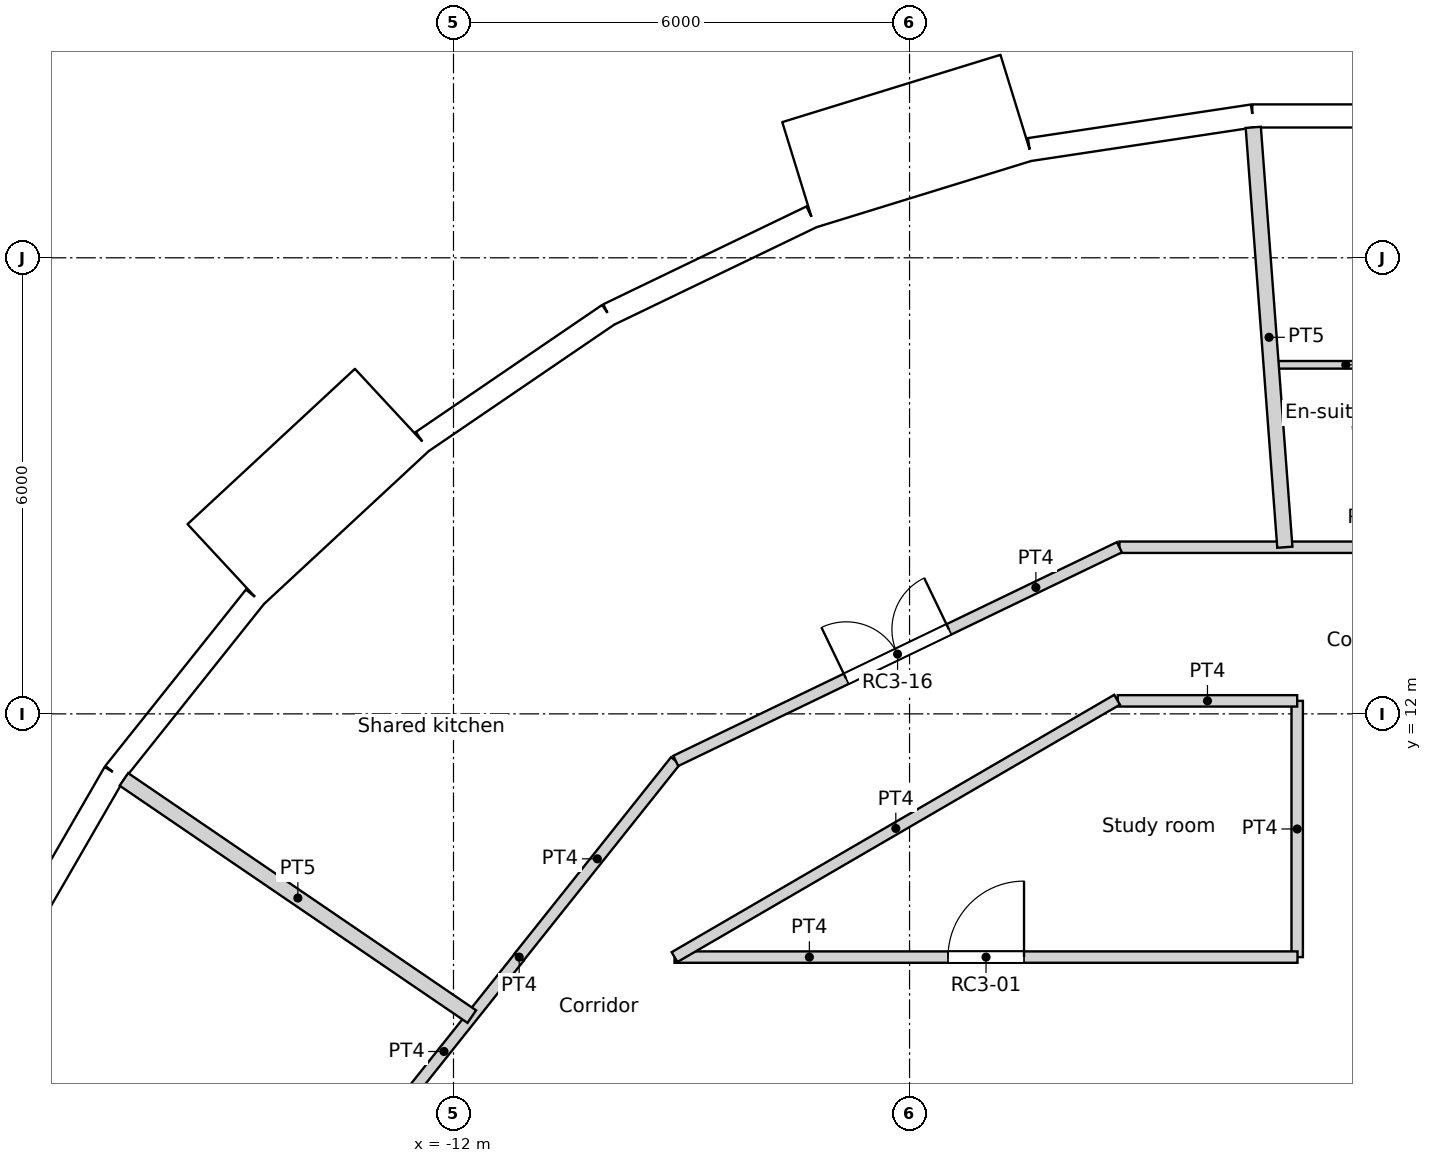
"""IFC4 building model, lengths in metres.
Left out: names, types, materials, properties, quantities, classifications, styles, units other than length and angle.
Written with IfcOpenShell. Run it as: python <this file> out.ifc"""

import sys

from ifc_helpers import new_model, si_unit, direction, frame, frame_2d, origin, origin_2d, place, context, subcontext, project, spatial, rectangle, circle, extrude, element, fill, save


model = new_model("IFC4")
c1 = context("Model", 3, precision=1e-05, world=origin(), true_north=direction((0.0, 1.0)))
c2 = subcontext(c1, "Body", "Model", "MODEL_VIEW")
j1 = project(units=[si_unit("LENGTHUNIT", "METRE"), si_unit("PLANEANGLEUNIT", "RADIAN")], contexts=[c1])
p1 = place(None, origin())
s1 = spatial("IfcSite", under=j1, at=p1, CompositionType="ELEMENT")
p2 = place(p1, origin())
s2 = spatial("IfcBuilding", under=s1, at=p2, CompositionType="ELEMENT")
p3 = place(p2, frame((0.0, 0.0, 252.6)))
s3 = spatial("IfcBuildingStorey", under=s2, at=p3, CompositionType="ELEMENT", Elevation=252.6)
for number, where, z_axis, x_axis in (
    (1, (-4.188, 18.35, 0.0), (0.0, 0.0, 1.0), (1.0, 0.0, 0.0)),
    (2, (-9.411, 16.301, 0.0), (0.0, 0.0, 1.0), (1.0, 0.0, 0.0)),
    (3, (-13.798, 12.802, 0.0), (0.0, 0.0, 1.0), (1.0, 0.0, 0.0)),
    (4, (-16.958, 8.167, 0.0), (0.0, 0.0, 1.0), (1.0, 0.0, 0.0)),
):
    element("IfcColumn", number, at=place(p3, frame(where, z_axis=z_axis, x_axis=x_axis)), inside=s3, PredefinedType="COLUMN", context=c2, shape_type="SweptSolid", body=[
        extrude(circle(Radius=0.55, at=origin_2d()), origin(), (0.0, 0.0, 1.0), 3.6),
    ])
p4 = place(p3, frame((1.473, 19.866, 0.0), z_axis=(0.0, 0.0, 1.0), x_axis=(-1.0, 0.0, 0.0)))
e5 = element("IfcWall", 5, at=p4, inside=s3, PredefinedType="SOLIDWALL", context=c2, shape_type="SweptSolid", body=[
    extrude(rectangle(XDim=2.962, YDim=0.3, at=frame_2d((1.481, 0.0))), origin(), (0.0, 0.0, 1.0), 3.25),
])
p5 = place(p4, frame((1.481, 0.0, 1.55)))
e6 = element("IfcOpeningElement", 6, at=p5, cuts=e5, PredefinedType="OPENING", context=c2, shape_type="SweptSolid", body=[
    extrude(circle(Radius=0.9, at=origin_2d()), frame((0.0, 0.16, 0.0), z_axis=(0.0, -1.0, 0.0), x_axis=(1.0, 0.0, 0.0)), (0.0, 0.0, 1.0), 0.32),
])
p6 = place(p3, frame((-1.489, 19.866, 0.0), z_axis=(0.0, 0.0, 1.0), x_axis=(-0.988835775663, -0.149009425104, 0.0)))
e7 = element("IfcWall", 7, at=p6, inside=s3, PredefinedType="SOLIDWALL", context=c2, shape_type="SweptSolid", body=[
    extrude(rectangle(XDim=2.962, YDim=0.3, at=frame_2d((1.481, 0.0))), origin(), (0.0, 0.0, 1.0), 3.25),
])
p7 = place(p6, frame((1.481, 0.0, 1.55)))
e8 = element("IfcOpeningElement", 8, at=p7, cuts=e7, PredefinedType="OPENING", context=c2, shape_type="SweptSolid", body=[
    extrude(circle(Radius=0.9, at=origin_2d()), frame((0.0, 0.16, 0.0), z_axis=(0.0, -1.0, 0.0), x_axis=(1.0, 0.0, 0.0)), (0.0, 0.0, 1.0), 0.32),
])
p8 = place(p3, frame((-4.592, 19.975, -0.35), z_axis=(0.0, 0.0, 1.0), x_axis=(-0.955571139978, -0.294760574774, 0.0)))
e9 = element("IfcWall", 9, at=p8, inside=s3, PredefinedType="ELEMENTEDWALL", context=c2, shape_type="SweptSolid", body=[
    extrude(rectangle(XDim=3.0, YDim=1.45, at=frame_2d((1.5, 0.0))), origin(), (0.0, 0.0, 1.0), 3.6),
])
p9 = place(p8, frame((1.5, 0.0, 1.9)))
e10 = element("IfcOpeningElement", 10, at=p9, cuts=e9, PredefinedType="OPENING", context=c2, shape_type="SweptSolid", body=[
    extrude(circle(Radius=0.9, at=origin_2d()), frame((0.0, 0.735, 0.0), z_axis=(0.0, -1.0, 0.0), x_axis=(1.0, 0.0, 0.0)), (0.0, 0.0, 1.0), 1.47),
])
p10 = place(p3, frame((-7.292, 18.538, 0.0), z_axis=(0.0, 0.0, 1.0), x_axis=(-0.90095513435, -0.433912255978, 0.0)))
e11 = element("IfcWall", 11, at=p10, inside=s3, PredefinedType="SOLIDWALL", context=c2, shape_type="SweptSolid", body=[
    extrude(rectangle(XDim=2.962, YDim=0.3, at=frame_2d((1.481, 0.0))), origin(), (0.0, 0.0, 1.0), 3.25),
])
p11 = place(p10, frame((1.481, 0.0, 1.55)))
e12 = element("IfcOpeningElement", 12, at=p11, cuts=e11, PredefinedType="OPENING", context=c2, shape_type="SweptSolid", body=[
    extrude(circle(Radius=0.9, at=origin_2d()), frame((0.0, 0.16, 0.0), z_axis=(0.0, -1.0, 0.0), x_axis=(1.0, 0.0, 0.0)), (0.0, 0.0, 1.0), 0.32),
])
p12 = place(p3, frame((-9.961, 17.253, 0.0), z_axis=(0.0, 0.0, 1.0), x_axis=(-0.826236061068, -0.563324037646, 0.0)))
e13 = element("IfcWall", 13, at=p12, inside=s3, PredefinedType="SOLIDWALL", context=c2, shape_type="SweptSolid", body=[
    extrude(rectangle(XDim=2.962, YDim=0.3, at=frame_2d((1.481, 0.0))), origin(), (0.0, 0.0, 1.0), 3.25),
])
p13 = place(p12, frame((1.481, 0.0, 1.55)))
e14 = element("IfcOpeningElement", 14, at=p13, cuts=e13, PredefinedType="OPENING", context=c2, shape_type="SweptSolid", body=[
    extrude(circle(Radius=0.9, at=origin_2d()), frame((0.0, 0.16, 0.0), z_axis=(0.0, -1.0, 0.0), x_axis=(1.0, 0.0, 0.0)), (0.0, 0.0, 1.0), 0.32),
])
p14 = place(p3, frame((-12.804, 16.005, -0.35), z_axis=(0.0, 0.0, 1.0), x_axis=(-0.733022439167, -0.680204457261, 0.0)))
e15 = element("IfcWall", 15, at=p14, inside=s3, PredefinedType="ELEMENTEDWALL", context=c2, shape_type="SweptSolid", body=[
    extrude(rectangle(XDim=3.0, YDim=1.45, at=frame_2d((1.5, 0.0))), origin(), (0.0, 0.0, 1.0), 3.6),
])
p15 = place(p14, frame((1.5, 0.0, 1.9)))
e16 = element("IfcOpeningElement", 16, at=p15, cuts=e15, PredefinedType="OPENING", context=c2, shape_type="SweptSolid", body=[
    extrude(circle(Radius=0.9, at=origin_2d()), frame((0.0, 0.735, 0.0), z_axis=(0.0, -1.0, 0.0), x_axis=(1.0, 0.0, 0.0)), (0.0, 0.0, 1.0), 1.47),
])
p16 = place(p3, frame((-14.613, 13.538, 0.0), z_axis=(0.0, 0.0, 1.0), x_axis=(-0.623498236992, -0.781824755599, 0.0)))
e17 = element("IfcWall", 17, at=p16, inside=s3, PredefinedType="SOLIDWALL", context=c2, shape_type="SweptSolid", body=[
    extrude(rectangle(XDim=2.962, YDim=0.3, at=frame_2d((1.481, 0.0))), origin(), (0.0, 0.0, 1.0), 3.25),
])
p17 = place(p16, frame((1.481, 0.0, 1.55)))
e18 = element("IfcOpeningElement", 18, at=p17, cuts=e17, PredefinedType="OPENING", context=c2, shape_type="SweptSolid", body=[
    extrude(circle(Radius=0.9, at=origin_2d()), frame((0.0, 0.16, 0.0), z_axis=(0.0, -1.0, 0.0), x_axis=(1.0, 0.0, 0.0)), (0.0, 0.0, 1.0), 0.32),
])
p18 = place(p3, frame((-16.46, 11.222, 0.0), z_axis=(0.0, 0.0, 1.0), x_axis=(-0.499950756475, -0.86605383268, 0.0)))
e19 = element("IfcWall", 19, at=p18, inside=s3, PredefinedType="SOLIDWALL", context=c2, shape_type="SweptSolid", body=[
    extrude(rectangle(XDim=2.962, YDim=0.3, at=frame_2d((1.481, 0.0))), origin(), (0.0, 0.0, 1.0), 3.25),
])
p19 = place(p18, frame((1.481, 0.0, 1.55)))
e20 = element("IfcOpeningElement", 20, at=p19, cuts=e19, PredefinedType="OPENING", context=c2, shape_type="SweptSolid", body=[
    extrude(circle(Radius=0.9, at=origin_2d()), frame((0.0, 0.16, 0.0), z_axis=(0.0, -1.0, 0.0), x_axis=(1.0, 0.0, 0.0)), (0.0, 0.0, 1.0), 0.32),
])
p20 = place(p3, frame((-9.092, 8.8, 0.0), z_axis=(0.0, 0.0, 1.0), x_axis=(0.864470922103, 0.502682827277, 0.0)))
e21 = element("IfcWall", 21, at=p20, inside=s3, PredefinedType="PARTITIONING", context=c2, shape_type="SweptSolid", body=[
    extrude(rectangle(XDim=6.735, YDim=0.15, at=frame_2d((3.368, 0.0))), origin(), (0.0, 0.0, 1.0), 3.25),
])
p21 = place(p3, frame((-9.092, 8.8, 0.0), z_axis=(0.0, 0.0, 1.0), x_axis=(1.0, 0.0, 0.0)))
e22 = element("IfcWall", 22, at=p21, inside=s3, PredefinedType="PARTITIONING", context=c2, shape_type="SweptSolid", body=[
    extrude(rectangle(XDim=8.196, YDim=0.15, at=frame_2d((4.098, 0.0))), origin(), (0.0, 0.0, 1.0), 3.25),
])
p22 = place(p21, frame((3.598, 0.0, 0.0)))
e23 = element("IfcOpeningElement", 23, at=p22, cuts=e22, PredefinedType="OPENING", context=c2, shape_type="SweptSolid", body=[
    extrude(rectangle(XDim=1.0, YDim=2.04, at=frame_2d((0.5, 1.02))), frame((0.0, 0.075, 0.0), z_axis=(0.0, -1.0, 0.0), x_axis=(1.0, 0.0, 0.0)), (0.0, 0.0, 1.0), 0.15),
])
p23 = place(p3, frame((-11.134, 8.8, 0.0), z_axis=(0.0, 0.0, 1.0), x_axis=(-1.0, 0.0, 0.0)))
e24 = element("IfcWall", 24, at=p23, inside=s3, PredefinedType="PARTITIONING", context=c2, shape_type="SweptSolid", body=[
    extrude(rectangle(XDim=0.003, YDim=0.15, at=frame_2d((0.001, 0.0))), origin(), (0.0, 0.0, 1.0), 3.25),
])
p24 = place(p3, frame((-11.136, 8.802, 0.0), z_axis=(0.0, 0.0, 1.0), x_axis=(0.623151397235, 0.782101231379, 0.0)))
e25 = element("IfcWall", 25, at=p24, inside=s3, PredefinedType="PARTITIONING", context=c2, shape_type="SweptSolid", body=[
    extrude(rectangle(XDim=3.301, YDim=0.15, at=frame_2d((1.65, 0.0))), origin(), (0.0, 0.0, 1.0), 3.25),
])
p25 = place(p3, frame((-0.9, 8.8, 0.0), z_axis=(0.0, 0.0, 1.0), x_axis=(0.0, 1.0, 0.0)))
e26 = element("IfcWall", 26, at=p25, inside=s3, PredefinedType="PARTITIONING", context=c2, shape_type="SweptSolid", body=[
    extrude(rectangle(XDim=3.371, YDim=0.15, at=frame_2d((1.686, 0.0))), origin(), (0.0, 0.0, 1.0), 3.25),
])
p26 = place(p3, frame((-3.261, 12.171, 0.0), z_axis=(0.0, 0.0, 1.0), x_axis=(1.0, 0.0, 0.0)))
e27 = element("IfcWall", 27, at=p26, inside=s3, PredefinedType="PARTITIONING", context=c2, shape_type="SweptSolid", body=[
    extrude(rectangle(XDim=2.361, YDim=0.15, at=frame_2d((1.181, 0.0))), origin(), (0.0, 0.0, 1.0), 3.25),
])
p27 = place(p3, frame((-3.239, 14.192, 0.0), z_axis=(0.0, 0.0, 1.0), x_axis=(1.0, 0.0, 0.0)))
e28 = element("IfcWall", 28, at=p27, inside=s3, PredefinedType="PARTITIONING", context=c2, shape_type="SweptSolid", body=[
    extrude(rectangle(XDim=6.478, YDim=0.15, at=frame_2d((3.239, 0.0))), origin(), (0.0, 0.0, 1.0), 3.25),
])
p28 = place(p3, frame((-9.076, 11.381, 0.0), z_axis=(0.0, 0.0, 1.0), x_axis=(0.900976027191, 0.433868872388, 0.0)))
e29 = element("IfcWall", 29, at=p28, inside=s3, PredefinedType="PARTITIONING", context=c2, shape_type="SweptSolid", body=[
    extrude(rectangle(XDim=6.479, YDim=0.15, at=frame_2d((3.239, 0.0))), origin(), (0.0, 0.0, 1.0), 3.25),
])
p29 = place(p28, frame((2.489, 0.0, 0.0)))
e30 = element("IfcOpeningElement", 30, at=p29, cuts=e29, PredefinedType="OPENING", context=c2, shape_type="SweptSolid", body=[
    extrude(rectangle(XDim=1.5, YDim=2.1, at=frame_2d((0.75, 1.05))), frame((0.0, 0.075, 0.0), z_axis=(0.0, -1.0, 0.0), x_axis=(1.0, 0.0, 0.0)), (0.0, 0.0, 1.0), 0.15),
])
p30 = place(p3, frame((-13.115, 6.316, 0.0), z_axis=(0.0, 0.0, 1.0), x_axis=(0.623560523309, 0.781775078761, 0.0)))
e31 = element("IfcWall", 31, at=p30, inside=s3, PredefinedType="PARTITIONING", context=c2, shape_type="SweptSolid", body=[
    extrude(rectangle(XDim=3.177, YDim=0.15, at=frame_2d((1.589, 0.0))), origin(), (0.0, 0.0, 1.0), 3.25),
])
p31 = place(p3, frame((-1.243, 16.592, 0.0), z_axis=(0.0, 0.0, 1.0), x_axis=(1.0, 0.0, 0.0)))
e32 = element("IfcWall", 32, at=p31, inside=s3, PredefinedType="PARTITIONING", context=c2, shape_type="SweptSolid", body=[
    extrude(rectangle(XDim=1.965, YDim=0.1, at=frame_2d((0.982, 0.0))), origin(), (0.0, 0.0, 1.0), 3.25),
])
for number, where, z_axis, x_axis in (
    (33, (-1.478, 19.716, 0.0), (0.0, 0.0, 1.0), (0.075, -0.997, 0.0)),
    (34, (-16.336, 11.138, 0.0), (0.0, 0.0, 1.0), (0.826, -0.563, 0.0)),
):
    element("IfcWall", number, at=place(p3, frame(where, z_axis=z_axis, x_axis=x_axis)), inside=s3, PredefinedType="PARTITIONING", context=c2, shape_type="SweptSolid", body=[
        extrude(rectangle(XDim=5.54, YDim=0.2, at=frame_2d((2.77, 0.0))), origin(), (0.0, 0.0, 1.0), 3.25),
    ])
p32 = place(p5, origin())
e35 = element("IfcWindow", 35, at=p32, inside=s3, PartitioningType="SINGLE_PANEL", PredefinedType="WINDOW", context=c2, shape_type="SweptSolid", body=[
    extrude(circle(Radius=0.9, at=origin_2d()), frame((0.0, 0.12, 0.0), z_axis=(0.0, -1.0, 0.0), x_axis=(1.0, 0.0, 0.0)), (0.0, 0.0, 1.0), 0.1),
])
fill(e6, e35)
p33 = place(p7, origin())
e36 = element("IfcWindow", 36, at=p33, inside=s3, PartitioningType="SINGLE_PANEL", PredefinedType="WINDOW", context=c2, shape_type="SweptSolid", body=[
    extrude(circle(Radius=0.9, at=origin_2d()), frame((0.0, 0.12, 0.0), z_axis=(0.0, -1.0, 0.0), x_axis=(1.0, 0.0, 0.0)), (0.0, 0.0, 1.0), 0.1),
])
fill(e8, e36)
p34 = place(p9, origin())
e37 = element("IfcWindow", 37, at=p34, inside=s3, PartitioningType="SINGLE_PANEL", PredefinedType="WINDOW", context=c2, shape_type="SweptSolid", body=[
    extrude(circle(Radius=0.9, at=origin_2d()), frame((0.0, 0.695, 0.0), z_axis=(0.0, -1.0, 0.0), x_axis=(1.0, 0.0, 0.0)), (0.0, 0.0, 1.0), 0.1),
])
fill(e10, e37)
p35 = place(p11, origin())
e38 = element("IfcWindow", 38, at=p35, inside=s3, PartitioningType="SINGLE_PANEL", PredefinedType="WINDOW", context=c2, shape_type="SweptSolid", body=[
    extrude(circle(Radius=0.9, at=origin_2d()), frame((0.0, 0.12, 0.0), z_axis=(0.0, -1.0, 0.0), x_axis=(1.0, 0.0, 0.0)), (0.0, 0.0, 1.0), 0.1),
])
fill(e12, e38)
p36 = place(p13, origin())
e39 = element("IfcWindow", 39, at=p36, inside=s3, PartitioningType="SINGLE_PANEL", PredefinedType="WINDOW", context=c2, shape_type="SweptSolid", body=[
    extrude(circle(Radius=0.9, at=origin_2d()), frame((0.0, 0.12, 0.0), z_axis=(0.0, -1.0, 0.0), x_axis=(1.0, 0.0, 0.0)), (0.0, 0.0, 1.0), 0.1),
])
fill(e14, e39)
p37 = place(p15, origin())
e40 = element("IfcWindow", 40, at=p37, inside=s3, PartitioningType="SINGLE_PANEL", PredefinedType="WINDOW", context=c2, shape_type="SweptSolid", body=[
    extrude(circle(Radius=0.9, at=origin_2d()), frame((0.0, 0.695, 0.0), z_axis=(0.0, -1.0, 0.0), x_axis=(1.0, 0.0, 0.0)), (0.0, 0.0, 1.0), 0.1),
])
fill(e16, e40)
p38 = place(p17, origin())
e41 = element("IfcWindow", 41, at=p38, inside=s3, PartitioningType="SINGLE_PANEL", PredefinedType="WINDOW", context=c2, shape_type="SweptSolid", body=[
    extrude(circle(Radius=0.9, at=origin_2d()), frame((0.0, 0.12, 0.0), z_axis=(0.0, -1.0, 0.0), x_axis=(1.0, 0.0, 0.0)), (0.0, 0.0, 1.0), 0.1),
])
fill(e18, e41)
p39 = place(p19, origin())
e42 = element("IfcWindow", 42, at=p39, inside=s3, PartitioningType="SINGLE_PANEL", PredefinedType="WINDOW", context=c2, shape_type="SweptSolid", body=[
    extrude(circle(Radius=0.9, at=origin_2d()), frame((0.0, 0.12, 0.0), z_axis=(0.0, -1.0, 0.0), x_axis=(1.0, 0.0, 0.0)), (0.0, 0.0, 1.0), 0.1),
])
fill(e20, e42)
p40 = place(p22, origin())
e43 = element("IfcDoor", 43, at=p40, inside=s3, OperationType="SINGLE_SWING_RIGHT", PredefinedType="DOOR", context=c2, shape_type="SweptSolid", body=[
    extrude(rectangle(XDim=1.0, YDim=2.04, at=frame_2d((0.5, 1.02))), frame((0.0, 0.025, 0.0), z_axis=(0.0, -1.0, 0.0), x_axis=(1.0, 0.0, 0.0)), (0.0, 0.0, 1.0), 0.05),
])
fill(e23, e43)
p41 = place(p29, origin())
e44 = element("IfcDoor", 44, at=p41, inside=s3, OperationType="DOUBLE_DOOR_SINGLE_SWING", PredefinedType="DOOR", context=c2, shape_type="SweptSolid", body=[
    extrude(rectangle(XDim=1.5, YDim=2.1, at=frame_2d((0.75, 1.05))), frame((0.0, 0.025, 0.0), z_axis=(0.0, -1.0, 0.0), x_axis=(1.0, 0.0, 0.0)), (0.0, 0.0, 1.0), 0.05),
])
fill(e30, e44)
save(model, sys.argv[1])
